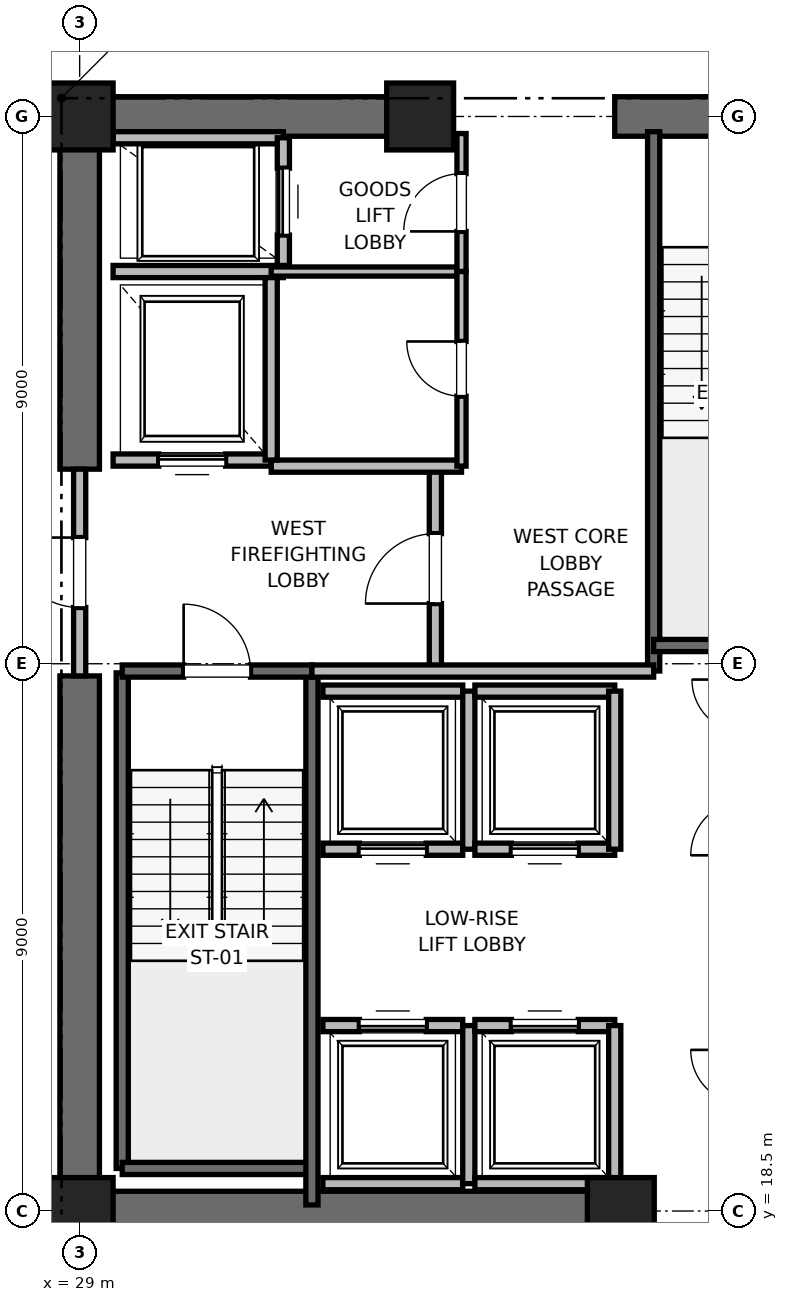
"""IFC4 building model, lengths in metres.
Left out: names, types, materials, properties, quantities, classifications, styles, units other than length and angle.
Written with IfcOpenShell. Run it as: python <this file> out.ifc"""

import sys

from ifc_helpers import new_model, si_unit, direction, frame, frame_2d, origin, origin_2d, place, context, subcontext, project, spatial, rectangle, extrude, element, fill, save


model = new_model("IFC4")
c1 = context("Model", 3, precision=1e-05, world=origin(), true_north=direction((0.0, 1.0)))
c2 = subcontext(c1, "Body", "Model", "MODEL_VIEW")
j1 = project(units=[si_unit("LENGTHUNIT", "METRE"), si_unit("PLANEANGLEUNIT", "RADIAN")], contexts=[c1])
p1 = place(None, origin())
s1 = spatial("IfcSite", under=j1, at=p1, CompositionType="ELEMENT")
p2 = place(p1, origin())
s2 = spatial("IfcBuilding", under=s1, at=p2, CompositionType="ELEMENT")
p3 = place(p2, frame((0.0, 0.0, 79.6)))
s3 = spatial("IfcBuildingStorey", under=s2, at=p3, CompositionType="ELEMENT", Elevation=79.6)
for number, where, z_axis, x_axis in (
    (1, (29.0, 18.5, 0.0), (0.0, 0.0, 1.0), (1.0, 0.0, 0.0)),
    (2, (29.0, 36.5, 0.0), (0.0, 0.0, 1.0), (1.0, 0.0, 0.0)),
    (3, (37.9, 18.5, 0.0), (0.0, 0.0, 1.0), (1.0, 0.0, 0.0)),
    (4, (34.6, 36.5, 0.0), (0.0, 0.0, 1.0), (1.0, 0.0, 0.0)),
):
    element("IfcColumn", number, at=place(p3, frame(where, z_axis=z_axis, x_axis=x_axis)), inside=s3, PredefinedType="PILASTER", context=c2, shape_type="SweptSolid", body=[
        extrude(rectangle(XDim=1.1, YDim=1.1, at=origin_2d()), origin(), (0.0, 0.0, 1.0), 4.0),
    ])
p4 = place(p3, frame((29.0, 18.5, 0.0), z_axis=(0.0, 0.0, 1.0), x_axis=(1.0, 0.0, 0.0)))
e5 = element("IfcWall", 5, at=p4, inside=s3, PredefinedType="SHEAR", context=c2, shape_type="SweptSolid", body=[
    extrude(rectangle(XDim=9.2, YDim=0.65, at=frame_2d((4.6, 0.0))), origin(), (0.0, 0.0, 1.0), 3.76),
])
p5 = place(p3, frame((29.0, 36.5, 0.0), z_axis=(0.0, 0.0, 1.0), x_axis=(1.0, 0.0, 0.0)))
e6 = element("IfcWall", 6, at=p5, inside=s3, PredefinedType="SHEAR", context=c2, shape_type="SweptSolid", body=[
    extrude(rectangle(XDim=5.8, YDim=0.65, at=frame_2d((2.9, 0.0))), origin(), (0.0, 0.0, 1.0), 3.76),
])
p6 = place(p3, frame((37.8, 36.5, 0.0), z_axis=(0.0, 0.0, 1.0), x_axis=(1.0, 0.0, 0.0)))
e7 = element("IfcWall", 7, at=p6, inside=s3, PredefinedType="SHEAR", context=c2, shape_type="SweptSolid", body=[
    extrude(rectangle(XDim=4.4, YDim=0.65, at=frame_2d((2.2, 0.0))), origin(), (0.0, 0.0, 1.0), 3.76),
])
p7 = place(p6, frame((1.65, 0.0, 0.0)))
e8 = element("IfcOpeningElement", 8, at=p7, cuts=e7, PredefinedType="OPENING", context=c2, shape_type="SweptSolid", body=[
    extrude(rectangle(XDim=1.1, YDim=2.15, at=frame_2d((0.55, 1.075))), frame((0.0, 0.325, 0.0), z_axis=(0.0, -1.0, 0.0), x_axis=(1.0, 0.0, 0.0)), (0.0, 0.0, 1.0), 0.65),
])
p8 = place(p3, frame((29.0, 18.5, 0.0), z_axis=(0.0, 0.0, 1.0), x_axis=(0.0, 1.0, 0.0)))
e9 = element("IfcWall", 9, at=p8, inside=s3, PredefinedType="SHEAR", context=c2, shape_type="SweptSolid", body=[
    extrude(rectangle(XDim=8.8, YDim=0.65, at=frame_2d((4.4, 0.0))), origin(), (0.0, 0.0, 1.0), 3.76),
])
p9 = place(p3, frame((29.0, 30.7, 0.0), z_axis=(0.0, 0.0, 1.0), x_axis=(0.0, 1.0, 0.0)))
e10 = element("IfcWall", 10, at=p9, inside=s3, PredefinedType="SHEAR", context=c2, shape_type="SweptSolid", body=[
    extrude(rectangle(XDim=5.8, YDim=0.65, at=frame_2d((2.9, 0.0))), origin(), (0.0, 0.0, 1.0), 3.76),
])
p10 = place(p3, frame((29.7, 19.2, 0.0), z_axis=(0.0, 0.0, 1.0), x_axis=(0.0, 1.0, 0.0)))
e11 = element("IfcWall", 11, at=p10, inside=s3, PredefinedType="SOLIDWALL", context=c2, shape_type="SweptSolid", body=[
    extrude(rectangle(XDim=8.15, YDim=0.2, at=frame_2d((4.075, 0.0))), origin(), (0.0, 0.0, 1.0), 3.76),
])
p11 = place(p3, frame((29.7, 19.2, 0.0), z_axis=(0.0, 0.0, 1.0), x_axis=(1.0, 0.0, 0.0)))
e12 = element("IfcWall", 12, at=p11, inside=s3, PredefinedType="SOLIDWALL", context=c2, shape_type="SweptSolid", body=[
    extrude(rectangle(XDim=3.12, YDim=0.2, at=frame_2d((1.56, 0.0))), origin(), (0.0, 0.0, 1.0), 3.76),
])
p12 = place(p3, frame((32.82, 18.6, 0.0), z_axis=(0.0, 0.0, 1.0), x_axis=(0.0, 1.0, 0.0)))
e13 = element("IfcWall", 13, at=p12, inside=s3, PredefinedType="SOLIDWALL", context=c2, shape_type="SweptSolid", body=[
    extrude(rectangle(XDim=8.78, YDim=0.2, at=frame_2d((4.39, 0.0))), origin(), (0.0, 0.0, 1.0), 3.76),
])
p13 = place(p3, frame((29.7, 27.38, 0.0), z_axis=(0.0, 0.0, 1.0), x_axis=(1.0, 0.0, 0.0)))
e14 = element("IfcWall", 14, at=p13, inside=s3, PredefinedType="SOLIDWALL", context=c2, shape_type="SweptSolid", body=[
    extrude(rectangle(XDim=3.12, YDim=0.2, at=frame_2d((1.56, 0.0))), origin(), (0.0, 0.0, 1.0), 3.76),
])
p14 = place(p13, frame((1.01, 0.0, 0.0)))
e15 = element("IfcOpeningElement", 15, at=p14, cuts=e14, PredefinedType="OPENING", context=c2, shape_type="SweptSolid", body=[
    extrude(rectangle(XDim=1.1, YDim=2.15, at=frame_2d((0.55, 1.075))), frame((0.0, 0.1, 0.0), z_axis=(0.0, -1.0, 0.0), x_axis=(1.0, 0.0, 0.0)), (0.0, 0.0, 1.0), 0.2),
])
p15 = place(p3, frame((38.44, 27.38, 0.0), z_axis=(0.0, 0.0, 1.0), x_axis=(0.0, 1.0, 0.0)))
e16 = element("IfcWall", 16, at=p15, inside=s3, PredefinedType="SOLIDWALL", context=c2, shape_type="SweptSolid", body=[
    extrude(rectangle(XDim=8.87, YDim=0.2, at=frame_2d((4.435, 0.0))), origin(), (0.0, 0.0, 1.0), 3.76),
])
p16 = place(p3, frame((38.44, 27.8, 0.0), z_axis=(0.0, 0.0, 1.0), x_axis=(1.0, 0.0, 0.0)))
e17 = element("IfcWall", 17, at=p16, inside=s3, PredefinedType="SOLIDWALL", context=c2, shape_type="SweptSolid", body=[
    extrude(rectangle(XDim=3.32, YDim=0.2, at=frame_2d((1.66, 0.0))), origin(), (0.0, 0.0, 1.0), 3.76),
])
p17 = place(p3, frame((34.85, 27.38, 0.0), z_axis=(0.0, 0.0, 1.0), x_axis=(0.0, 1.0, 0.0)))
e18 = element("IfcWall", 18, at=p17, inside=s3, PredefinedType="PARTITIONING", context=c2, shape_type="SweptSolid", body=[
    extrude(rectangle(XDim=3.37, YDim=0.2, at=frame_2d((1.685, 0.0))), origin(), (0.0, 0.0, 1.0), 3.76),
])
p18 = place(p17, frame((1.11, 0.0, 0.0)))
e19 = element("IfcOpeningElement", 19, at=p18, cuts=e18, PredefinedType="OPENING", context=c2, shape_type="SweptSolid", body=[
    extrude(rectangle(XDim=1.15, YDim=2.2, at=frame_2d((0.575, 1.1))), frame((0.0, 0.1, 0.0), z_axis=(0.0, -1.0, 0.0), x_axis=(1.0, 0.0, 0.0)), (0.0, 0.0, 1.0), 0.2),
])
p19 = place(p3, frame((29.0, 27.3, 0.0), z_axis=(0.0, 0.0, 1.0), x_axis=(0.0, 1.0, 0.0)))
e20 = element("IfcWall", 20, at=p19, inside=s3, PredefinedType="PARTITIONING", context=c2, shape_type="SweptSolid", body=[
    extrude(rectangle(XDim=3.4, YDim=0.2, at=frame_2d((1.7, 0.0))), origin(), (0.0, 0.0, 1.0), 2.54),
])
p20 = place(p19, frame((1.125, 0.0, 0.0)))
e21 = element("IfcOpeningElement", 21, at=p20, cuts=e20, PredefinedType="OPENING", context=c2, shape_type="SweptSolid", body=[
    extrude(rectangle(XDim=1.15, YDim=2.2, at=frame_2d((0.575, 1.1))), frame((0.0, 0.1, 0.0), z_axis=(0.0, -1.0, 0.0), x_axis=(1.0, 0.0, 0.0)), (0.0, 0.0, 1.0), 0.2),
])
p21 = place(p3, frame((32.82, 27.38, 0.0), z_axis=(0.0, 0.0, 1.0), x_axis=(1.0, 0.0, 0.0)))
e22 = element("IfcWall", 22, at=p21, inside=s3, PredefinedType="PARTITIONING", context=c2, shape_type="SweptSolid", body=[
    extrude(rectangle(XDim=5.62, YDim=0.2, at=frame_2d((2.81, 0.0))), origin(), (0.0, 0.0, 1.0), 3.76),
])
p22 = place(p3, frame((32.15, 30.75, 0.0), z_axis=(0.0, 0.0, 1.0), x_axis=(1.0, 0.0, 0.0)))
e23 = element("IfcWall", 23, at=p22, inside=s3, PredefinedType="PARTITIONING", context=c2, shape_type="SweptSolid", body=[
    extrude(rectangle(XDim=3.13, YDim=0.2, at=frame_2d((1.565, 0.0))), origin(), (0.0, 0.0, 1.0), 3.76),
])
p23 = place(p3, frame((29.55, 30.85, 0.0), z_axis=(0.0, 0.0, 1.0), x_axis=(1.0, 0.0, 0.0)))
e24 = element("IfcWall", 24, at=p23, inside=s3, PredefinedType="SOLIDWALL", context=c2, shape_type="SweptSolid", body=[
    extrude(rectangle(XDim=2.6, YDim=0.2, at=frame_2d((1.3, 0.0))), origin(), (0.0, 0.0, 1.0), 2.54),
])
p24 = place(p23, frame((0.75, 0.0, 0.0)))
e25 = element("IfcOpeningElement", 25, at=p24, cuts=e24, PredefinedType="OPENING", context=c2, shape_type="SweptSolid", body=[
    extrude(rectangle(XDim=1.1, YDim=2.2, at=frame_2d((0.55, 1.1))), frame((0.0, 0.1, 0.0), z_axis=(0.0, -1.0, 0.0), x_axis=(1.0, 0.0, 0.0)), (0.0, 0.0, 1.0), 0.2),
])
p25 = place(p3, frame((29.55, 33.95, 0.0), z_axis=(0.0, 0.0, 1.0), x_axis=(1.0, 0.0, 0.0)))
e26 = element("IfcWall", 26, at=p25, inside=s3, PredefinedType="SOLIDWALL", context=c2, shape_type="SweptSolid", body=[
    extrude(rectangle(XDim=2.8, YDim=0.2, at=frame_2d((1.4, 0.0))), origin(), (0.0, 0.0, 1.0), 3.76),
])
p26 = place(p3, frame((32.15, 30.85, 0.0), z_axis=(0.0, 0.0, 1.0), x_axis=(0.0, 1.0, 0.0)))
e27 = element("IfcWall", 27, at=p26, inside=s3, PredefinedType="SOLIDWALL", context=c2, shape_type="SweptSolid", body=[
    extrude(rectangle(XDim=3.0, YDim=0.2, at=frame_2d((1.5, 0.0))), origin(), (0.0, 0.0, 1.0), 3.76),
])
p27 = place(p3, frame((32.35, 36.15, 0.0), z_axis=(0.0, 0.0, 1.0), x_axis=(-1.0, 0.0, 0.0)))
e28 = element("IfcWall", 28, at=p27, inside=s3, PredefinedType="SOLIDWALL", context=c2, shape_type="SweptSolid", body=[
    extrude(rectangle(XDim=2.8, YDim=0.2, at=frame_2d((1.4, 0.0))), origin(), (0.0, 0.0, 1.0), 2.889),
])
p28 = place(p3, frame((32.35, 34.05, 0.0), z_axis=(0.0, 0.0, 1.0), x_axis=(0.0, 1.0, 0.0)))
e29 = element("IfcWall", 29, at=p28, inside=s3, PredefinedType="SOLIDWALL", context=c2, shape_type="SweptSolid", body=[
    extrude(rectangle(XDim=2.1, YDim=0.2, at=frame_2d((1.05, 0.0))), origin(), (0.0, 0.0, 1.0), 3.76),
])
p29 = place(p28, frame((0.5, 0.0, 0.0)))
e30 = element("IfcOpeningElement", 30, at=p29, cuts=e29, PredefinedType="OPENING", context=c2, shape_type="SweptSolid", body=[
    extrude(rectangle(XDim=1.1, YDim=2.2, at=frame_2d((0.55, 1.1))), frame((0.0, 0.1, 0.0), z_axis=(0.0, -1.0, 0.0), x_axis=(1.0, 0.0, 0.0)), (0.0, 0.0, 1.0), 0.2),
])
p30 = place(p3, frame((33.0, 18.95, 0.0), z_axis=(0.0, 0.0, 1.0), x_axis=(1.0, 0.0, 0.0)))
e31 = element("IfcWall", 31, at=p30, inside=s3, PredefinedType="SOLIDWALL", context=c2, shape_type="SweptSolid", body=[
    extrude(rectangle(XDim=2.3, YDim=0.2, at=frame_2d((1.15, 0.0))), origin(), (0.0, 0.0, 1.0), 3.76),
])
p31 = place(p3, frame((35.3, 21.55, 0.0), z_axis=(0.0, 0.0, 1.0), x_axis=(-1.0, 0.0, 0.0)))
e32 = element("IfcWall", 32, at=p31, inside=s3, PredefinedType="SOLIDWALL", context=c2, shape_type="SweptSolid", body=[
    extrude(rectangle(XDim=2.3, YDim=0.2, at=frame_2d((1.15, 0.0))), origin(), (0.0, 0.0, 1.0), 3.76),
])
p32 = place(p31, frame((0.6, 0.0, 0.0)))
e33 = element("IfcOpeningElement", 33, at=p32, cuts=e32, PredefinedType="OPENING", context=c2, shape_type="SweptSolid", body=[
    extrude(rectangle(XDim=1.1, YDim=2.2, at=frame_2d((0.55, 1.1))), frame((0.0, 0.1, 0.0), z_axis=(0.0, -1.0, 0.0), x_axis=(1.0, 0.0, 0.0)), (0.0, 0.0, 1.0), 0.2),
])
p33 = place(p3, frame((35.4, 18.95, 0.0), z_axis=(0.0, 0.0, 1.0), x_axis=(0.0, 1.0, 0.0)))
e34 = element("IfcWall", 34, at=p33, inside=s3, PredefinedType="SOLIDWALL", context=c2, shape_type="SweptSolid", body=[
    extrude(rectangle(XDim=2.6, YDim=0.2, at=frame_2d((1.3, 0.0))), origin(), (0.0, 0.0, 1.0), 3.76),
])
p34 = place(p3, frame((35.5, 18.95, 0.0), z_axis=(0.0, 0.0, 1.0), x_axis=(1.0, 0.0, 0.0)))
e35 = element("IfcWall", 35, at=p34, inside=s3, PredefinedType="SOLIDWALL", context=c2, shape_type="SweptSolid", body=[
    extrude(rectangle(XDim=2.3, YDim=0.2, at=frame_2d((1.15, 0.0))), origin(), (0.0, 0.0, 1.0), 2.54),
])
p35 = place(p3, frame((37.8, 21.55, 0.0), z_axis=(0.0, 0.0, 1.0), x_axis=(-1.0, 0.0, 0.0)))
e36 = element("IfcWall", 36, at=p35, inside=s3, PredefinedType="SOLIDWALL", context=c2, shape_type="SweptSolid", body=[
    extrude(rectangle(XDim=2.3, YDim=0.2, at=frame_2d((1.15, 0.0))), origin(), (0.0, 0.0, 1.0), 3.76),
])
p36 = place(p35, frame((0.6, 0.0, 0.0)))
e37 = element("IfcOpeningElement", 37, at=p36, cuts=e36, PredefinedType="OPENING", context=c2, shape_type="SweptSolid", body=[
    extrude(rectangle(XDim=1.1, YDim=2.2, at=frame_2d((0.55, 1.1))), frame((0.0, 0.1, 0.0), z_axis=(0.0, -1.0, 0.0), x_axis=(1.0, 0.0, 0.0)), (0.0, 0.0, 1.0), 0.2),
])
p37 = place(p3, frame((37.8, 18.95, 0.0), z_axis=(0.0, 0.0, 1.0), x_axis=(0.0, 1.0, 0.0)))
e38 = element("IfcWall", 38, at=p37, inside=s3, PredefinedType="SOLIDWALL", context=c2, shape_type="SweptSolid", body=[
    extrude(rectangle(XDim=2.6, YDim=0.2, at=frame_2d((1.3, 0.0))), origin(), (0.0, 0.0, 1.0), 2.54),
])
p38 = place(p3, frame((33.0, 24.45, 0.0), z_axis=(0.0, 0.0, 1.0), x_axis=(1.0, 0.0, 0.0)))
e39 = element("IfcWall", 39, at=p38, inside=s3, PredefinedType="SOLIDWALL", context=c2, shape_type="SweptSolid", body=[
    extrude(rectangle(XDim=2.3, YDim=0.2, at=frame_2d((1.15, 0.0))), origin(), (0.0, 0.0, 1.0), 3.76),
])
p39 = place(p38, frame((0.6, 0.0, 0.0)))
e40 = element("IfcOpeningElement", 40, at=p39, cuts=e39, PredefinedType="OPENING", context=c2, shape_type="SweptSolid", body=[
    extrude(rectangle(XDim=1.1, YDim=2.2, at=frame_2d((0.55, 1.1))), frame((0.0, 0.1, 0.0), z_axis=(0.0, -1.0, 0.0), x_axis=(1.0, 0.0, 0.0)), (0.0, 0.0, 1.0), 0.2),
])
p40 = place(p3, frame((35.3, 27.05, 0.0), z_axis=(0.0, 0.0, 1.0), x_axis=(-1.0, 0.0, 0.0)))
e41 = element("IfcWall", 41, at=p40, inside=s3, PredefinedType="SOLIDWALL", context=c2, shape_type="SweptSolid", body=[
    extrude(rectangle(XDim=2.3, YDim=0.2, at=frame_2d((1.15, 0.0))), origin(), (0.0, 0.0, 1.0), 3.76),
])
p41 = place(p3, frame((35.4, 24.45, 0.0), z_axis=(0.0, 0.0, 1.0), x_axis=(0.0, 1.0, 0.0)))
e42 = element("IfcWall", 42, at=p41, inside=s3, PredefinedType="SOLIDWALL", context=c2, shape_type="SweptSolid", body=[
    extrude(rectangle(XDim=2.6, YDim=0.2, at=frame_2d((1.3, 0.0))), origin(), (0.0, 0.0, 1.0), 3.76),
])
p42 = place(p3, frame((35.5, 24.45, 0.0), z_axis=(0.0, 0.0, 1.0), x_axis=(1.0, 0.0, 0.0)))
e43 = element("IfcWall", 43, at=p42, inside=s3, PredefinedType="SOLIDWALL", context=c2, shape_type="SweptSolid", body=[
    extrude(rectangle(XDim=2.3, YDim=0.2, at=frame_2d((1.15, 0.0))), origin(), (0.0, 0.0, 1.0), 3.76),
])
p43 = place(p42, frame((0.6, 0.0, 0.0)))
e44 = element("IfcOpeningElement", 44, at=p43, cuts=e43, PredefinedType="OPENING", context=c2, shape_type="SweptSolid", body=[
    extrude(rectangle(XDim=1.1, YDim=2.2, at=frame_2d((0.55, 1.1))), frame((0.0, 0.1, 0.0), z_axis=(0.0, -1.0, 0.0), x_axis=(1.0, 0.0, 0.0)), (0.0, 0.0, 1.0), 0.2),
])
p44 = place(p3, frame((37.8, 27.05, 0.0), z_axis=(0.0, 0.0, 1.0), x_axis=(-1.0, 0.0, 0.0)))
e45 = element("IfcWall", 45, at=p44, inside=s3, PredefinedType="SOLIDWALL", context=c2, shape_type="SweptSolid", body=[
    extrude(rectangle(XDim=2.3, YDim=0.2, at=frame_2d((1.15, 0.0))), origin(), (0.0, 0.0, 1.0), 3.76),
])
p45 = place(p3, frame((37.8, 24.45, 0.0), z_axis=(0.0, 0.0, 1.0), x_axis=(0.0, 1.0, 0.0)))
e46 = element("IfcWall", 46, at=p45, inside=s3, PredefinedType="SOLIDWALL", context=c2, shape_type="SweptSolid", body=[
    extrude(rectangle(XDim=2.6, YDim=0.2, at=frame_2d((1.3, 0.0))), origin(), (0.0, 0.0, 1.0), 3.76),
])
p46 = place(p3, frame((32.15, 33.95, 0.0), z_axis=(0.0, 0.0, 1.0), x_axis=(1.0, 0.0, 0.0)))
e47 = element("IfcWall", 47, at=p46, inside=s3, PredefinedType="PARTITIONING", context=c2, shape_type="SweptSolid", body=[
    extrude(rectangle(XDim=3.13, YDim=0.15, at=frame_2d((1.565, 0.0))), origin(), (0.0, 0.0, 1.0), 2.85),
])
p47 = place(p3, frame((35.28, 33.95, 0.0), z_axis=(0.0, 0.0, 1.0), x_axis=(0.0, 1.0, 0.0)))
e48 = element("IfcWall", 48, at=p47, inside=s3, PredefinedType="PARTITIONING", context=c2, shape_type="SweptSolid", body=[
    extrude(rectangle(XDim=2.27, YDim=0.15, at=frame_2d((1.135, 0.0))), origin(), (0.0, 0.0, 1.0), 2.54),
])
p48 = place(p47, frame((0.66, 0.0, 0.0)))
e49 = element("IfcOpeningElement", 49, at=p48, cuts=e48, PredefinedType="OPENING", context=c2, shape_type="SweptSolid", body=[
    extrude(rectangle(XDim=0.95, YDim=2.15, at=frame_2d((0.475, 1.075))), frame((0.0, 0.075, 0.0), z_axis=(0.0, -1.0, 0.0), x_axis=(1.0, 0.0, 0.0)), (0.0, 0.0, 1.0), 0.15),
])
p49 = place(p3, frame((35.28, 30.75, 0.0), z_axis=(0.0, 0.0, 1.0), x_axis=(0.0, 1.0, 0.0)))
e50 = element("IfcWall", 50, at=p49, inside=s3, PredefinedType="PARTITIONING", context=c2, shape_type="SweptSolid", body=[
    extrude(rectangle(XDim=3.2, YDim=0.15, at=frame_2d((1.6, 0.0))), origin(), (0.0, 0.0, 1.0), 2.85),
])
p50 = place(p49, frame((1.15, 0.0, 0.0)))
e51 = element("IfcOpeningElement", 51, at=p50, cuts=e50, PredefinedType="OPENING", context=c2, shape_type="SweptSolid", body=[
    extrude(rectangle(XDim=0.9, YDim=2.1, at=frame_2d((0.45, 1.05))), frame((0.0, 0.075, 0.0), z_axis=(0.0, -1.0, 0.0), x_axis=(1.0, 0.0, 0.0)), (0.0, 0.0, 1.0), 0.15),
])
p51 = place(p14, origin())
e52 = element("IfcDoor", 52, at=p51, inside=s3, OperationType="SINGLE_SWING_LEFT", PredefinedType="DOOR", context=c2, shape_type="SweptSolid", body=[
    extrude(rectangle(XDim=1.1, YDim=2.15, at=frame_2d((0.55, 1.075))), frame((0.0, 0.025, 0.0), z_axis=(0.0, -1.0, 0.0), x_axis=(1.0, 0.0, 0.0)), (0.0, 0.0, 1.0), 0.05),
])
fill(e15, e52)
p52 = place(p18, origin())
e53 = element("IfcDoor", 53, at=p52, inside=s3, OperationType="SINGLE_SWING_LEFT", PredefinedType="DOOR", context=c2, shape_type="SweptSolid", body=[
    extrude(rectangle(XDim=1.15, YDim=2.2, at=frame_2d((0.575, 1.1))), frame((0.0, 0.025, 0.0), z_axis=(0.0, -1.0, 0.0), x_axis=(1.0, 0.0, 0.0)), (0.0, 0.0, 1.0), 0.05),
])
fill(e19, e53)
p53 = place(p20, origin())
e54 = element("IfcDoor", 54, at=p53, inside=s3, OperationType="SINGLE_SWING_RIGHT", PredefinedType="DOOR", context=c2, shape_type="SweptSolid", body=[
    extrude(rectangle(XDim=1.15, YDim=2.2, at=frame_2d((0.575, 1.1))), frame((0.0, 0.025, 0.0), z_axis=(0.0, -1.0, 0.0), x_axis=(1.0, 0.0, 0.0)), (0.0, 0.0, 1.0), 0.05),
])
fill(e21, e54)
p54 = place(p24, origin())
e55 = element("IfcDoor", 55, at=p54, inside=s3, OperationType="SLIDING_TO_RIGHT", PredefinedType="DOOR", context=c2, shape_type="SweptSolid", body=[
    extrude(rectangle(XDim=1.1, YDim=2.2, at=frame_2d((0.55, 1.1))), frame((0.0, 0.025, 0.0), z_axis=(0.0, -1.0, 0.0), x_axis=(1.0, 0.0, 0.0)), (0.0, 0.0, 1.0), 0.05),
])
fill(e25, e55)
p55 = place(p29, origin())
e56 = element("IfcDoor", 56, at=p55, inside=s3, OperationType="SLIDING_TO_RIGHT", PredefinedType="DOOR", context=c2, shape_type="SweptSolid", body=[
    extrude(rectangle(XDim=1.1, YDim=2.2, at=frame_2d((0.55, 1.1))), frame((0.0, 0.025, 0.0), z_axis=(0.0, -1.0, 0.0), x_axis=(1.0, 0.0, 0.0)), (0.0, 0.0, 1.0), 0.05),
])
fill(e30, e56)
p56 = place(p32, origin())
e57 = element("IfcDoor", 57, at=p56, inside=s3, OperationType="SLIDING_TO_RIGHT", PredefinedType="DOOR", context=c2, shape_type="SweptSolid", body=[
    extrude(rectangle(XDim=1.1, YDim=2.2, at=frame_2d((0.55, 1.1))), frame((0.0, 0.025, 0.0), z_axis=(0.0, -1.0, 0.0), x_axis=(1.0, 0.0, 0.0)), (0.0, 0.0, 1.0), 0.05),
])
fill(e33, e57)
p57 = place(p36, origin())
e58 = element("IfcDoor", 58, at=p57, inside=s3, OperationType="SLIDING_TO_RIGHT", PredefinedType="DOOR", context=c2, shape_type="SweptSolid", body=[
    extrude(rectangle(XDim=1.1, YDim=2.2, at=frame_2d((0.55, 1.1))), frame((0.0, 0.025, 0.0), z_axis=(0.0, -1.0, 0.0), x_axis=(1.0, 0.0, 0.0)), (0.0, 0.0, 1.0), 0.05),
])
fill(e37, e58)
p58 = place(p39, origin())
e59 = element("IfcDoor", 59, at=p58, inside=s3, OperationType="SLIDING_TO_RIGHT", PredefinedType="DOOR", context=c2, shape_type="SweptSolid", body=[
    extrude(rectangle(XDim=1.1, YDim=2.2, at=frame_2d((0.55, 1.1))), frame((0.0, 0.025, 0.0), z_axis=(0.0, -1.0, 0.0), x_axis=(1.0, 0.0, 0.0)), (0.0, 0.0, 1.0), 0.05),
])
fill(e40, e59)
p59 = place(p43, origin())
e60 = element("IfcDoor", 60, at=p59, inside=s3, OperationType="SLIDING_TO_RIGHT", PredefinedType="DOOR", context=c2, shape_type="SweptSolid", body=[
    extrude(rectangle(XDim=1.1, YDim=2.2, at=frame_2d((0.55, 1.1))), frame((0.0, 0.025, 0.0), z_axis=(0.0, -1.0, 0.0), x_axis=(1.0, 0.0, 0.0)), (0.0, 0.0, 1.0), 0.05),
])
fill(e44, e60)
p60 = place(p48, origin())
e61 = element("IfcDoor", 61, at=p60, inside=s3, OperationType="SINGLE_SWING_LEFT", PredefinedType="DOOR", context=c2, shape_type="SweptSolid", body=[
    extrude(rectangle(XDim=0.95, YDim=2.15, at=frame_2d((0.475, 1.075))), frame((0.0, 0.025, 0.0), z_axis=(0.0, -1.0, 0.0), x_axis=(1.0, 0.0, 0.0)), (0.0, 0.0, 1.0), 0.05),
])
fill(e49, e61)
p61 = place(p50, origin())
e62 = element("IfcDoor", 62, at=p61, inside=s3, OperationType="SINGLE_SWING_RIGHT", PredefinedType="DOOR", context=c2, shape_type="SweptSolid", body=[
    extrude(rectangle(XDim=0.9, YDim=2.1, at=frame_2d((0.45, 1.05))), frame((0.0, 0.025, 0.0), z_axis=(0.0, -1.0, 0.0), x_axis=(1.0, 0.0, 0.0)), (0.0, 0.0, 1.0), 0.05),
])
fill(e51, e62)
save(model, sys.argv[1])
